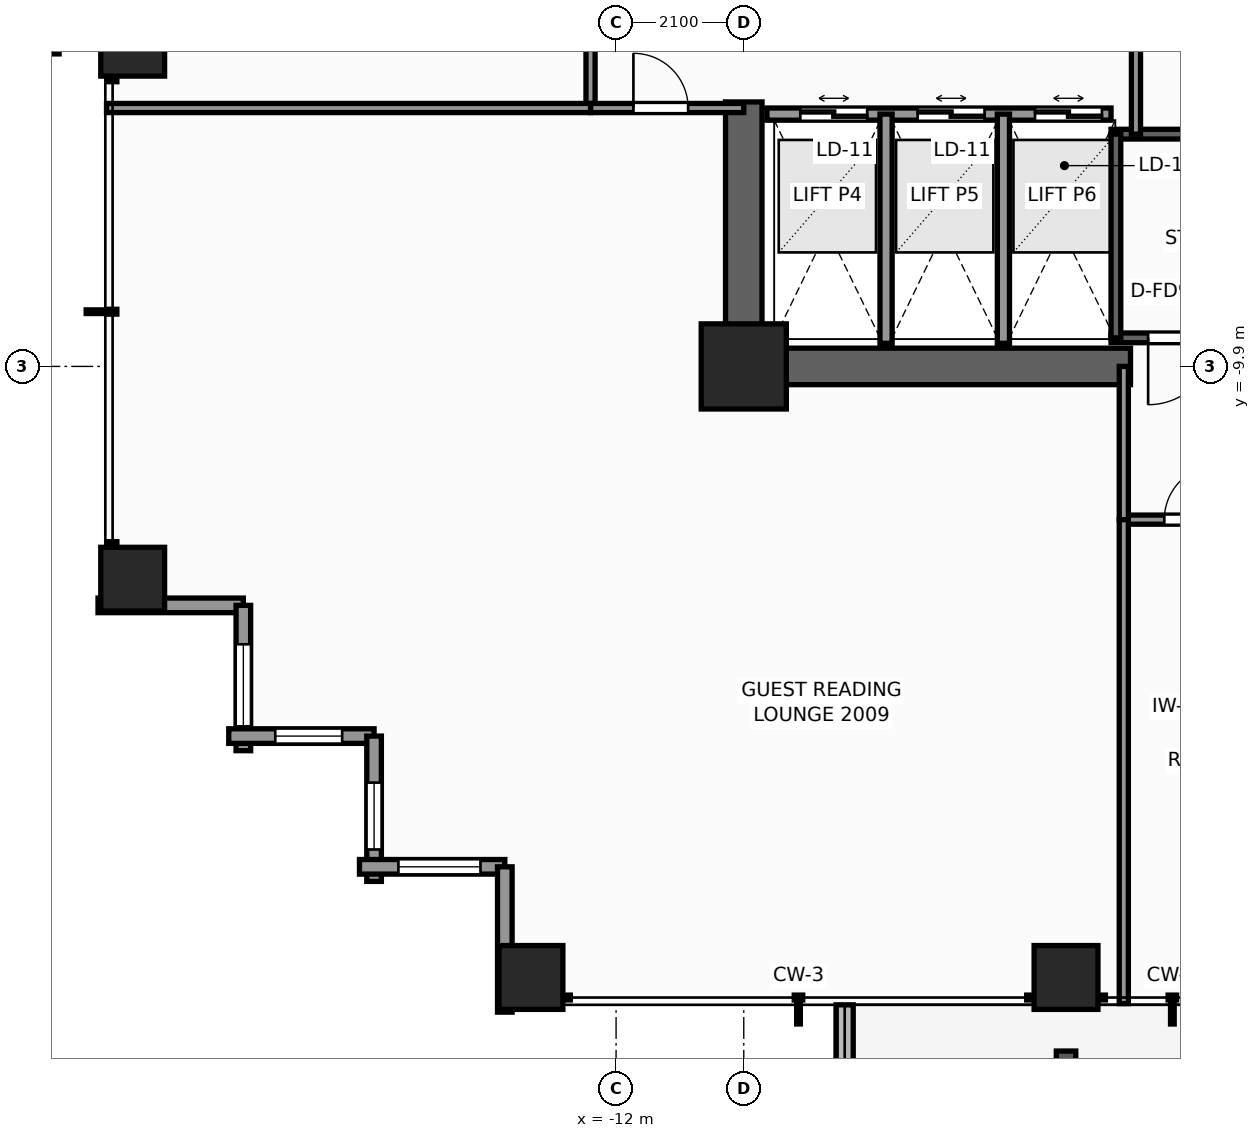
"""IFC4 building model, lengths in metres.
Left out: names, types, materials, properties, quantities, classifications, styles, units other than length and angle.
Written with IfcOpenShell. Run it as: python <this file> out.ifc"""

import sys

from ifc_helpers import new_model, si_unit, direction, frame, frame_2d, origin, origin_2d, place, context, subcontext, project, spatial, rectangle, extrude, element, fill, save


model = new_model("IFC4")
c1 = context("Model", 3, precision=1e-05, world=origin(), true_north=direction((0.0, 1.0)))
c2 = subcontext(c1, "Body", "Model", "MODEL_VIEW")
j1 = project(units=[si_unit("LENGTHUNIT", "METRE"), si_unit("PLANEANGLEUNIT", "RADIAN")], contexts=[c1])
p1 = place(None, origin())
s1 = spatial("IfcSite", under=j1, at=p1, CompositionType="ELEMENT")
p2 = place(p1, origin())
s2 = spatial("IfcBuilding", under=s1, at=p2, CompositionType="ELEMENT")
p3 = place(p2, frame((0.0, 0.0, 72.2)))
s3 = spatial("IfcBuildingStorey", under=s2, at=p3, CompositionType="ELEMENT", Elevation=72.2)
p4 = place(p3, frame((-3.54, -9.9, 0.0), z_axis=(0.0, 0.0, 1.0), x_axis=(-1.0, 0.0, 0.0)))
e1 = element("IfcWall", 1, at=p4, inside=s3, PredefinedType="SHEAR", context=c2, shape_type="SweptSolid", body=[
    extrude(rectangle(XDim=6.66, YDim=0.6, at=frame_2d((3.33, 0.0))), origin(), (0.0, 0.0, 1.0), 3.3),
])
p5 = place(p3, frame((-9.9, -9.6, 0.0), z_axis=(0.0, 0.0, 1.0), x_axis=(0.0, 1.0, 0.0)))
e2 = element("IfcWall", 2, at=p5, inside=s3, PredefinedType="SHEAR", context=c2, shape_type="SweptSolid", body=[
    extrude(rectangle(XDim=4.05, YDim=0.6, at=frame_2d((2.025, 0.0))), origin(), (0.0, 0.0, 1.0), 3.3),
])
p6 = place(p3, frame((-9.9, -9.9, 0.0), z_axis=(0.0, 0.0, 1.0), x_axis=(1.0, 0.0, 0.0)))
e3 = element("IfcColumn", 3, at=p6, inside=s3, PredefinedType="COLUMN", context=c2, shape_type="SweptSolid", body=[
    extrude(rectangle(XDim=1.4, YDim=1.4, at=origin_2d()), origin(), (0.0, 0.0, 1.0), 3.3),
])
for number, where, z_axis, x_axis in (
    (4, (-13.4, -19.95, 0.0), (0.0, 0.0, 1.0), (1.0, 0.0, 0.0)),
    (5, (-4.6, -19.95, 0.0), (0.0, 0.0, 1.0), (1.0, 0.0, 0.0)),
    (6, (-19.95, -13.4, 0.0), (0.0, 0.0, 1.0), (1.0, 0.0, 0.0)),
    (7, (-19.95, -4.6, 0.0), (0.0, 0.0, 1.0), (1.0, 0.0, 0.0)),
):
    element("IfcColumn", number, at=place(p3, frame(where, z_axis=z_axis, x_axis=x_axis)), inside=s3, PredefinedType="COLUMN", context=c2, shape_type="SweptSolid", body=[
        extrude(rectangle(XDim=1.05, YDim=1.05, at=origin_2d()), origin(), (0.0, 0.0, 1.0), 3.3),
    ])
p7 = place(p3, frame((-8.24, -20.4, -0.04), z_axis=(0.0, 0.0, 1.0), x_axis=(0.0, -1.0, 0.0)))
e8 = element("IfcWall", 8, at=p7, inside=s3, PredefinedType="PARAPET", context=c2, shape_type="SweptSolid", body=[
    extrude(rectangle(XDim=3.42, YDim=0.28, at=frame_2d((1.71, 0.0))), origin(), (0.0, 0.0, 1.0), 0.42),
])
p8 = place(p3, frame((-18.13, -13.83, 0.0), z_axis=(0.0, 0.0, 1.0), x_axis=(-1.0, 0.0, 0.0)))
e9 = element("IfcWall", 9, at=p8, inside=s3, PredefinedType="STANDARD", context=c2, shape_type="SweptSolid", body=[
    extrude(rectangle(XDim=2.39, YDim=0.24, at=frame_2d((1.195, 0.0))), origin(), (0.0, 0.0, 1.0), 2.459),
])
p9 = place(p3, frame((-18.13, -16.22, 0.0), z_axis=(0.0, 0.0, 1.0), x_axis=(0.0, 1.0, 0.0)))
e10 = element("IfcWall", 10, at=p9, inside=s3, PredefinedType="STANDARD", context=c2, shape_type="SweptSolid", body=[
    extrude(rectangle(XDim=2.39, YDim=0.24, at=frame_2d((1.195, 0.0))), origin(), (0.0, 0.0, 1.0), 2.459),
])
p10 = place(p9, frame((0.4, 0.0, 0.65)))
e11 = element("IfcOpeningElement", 11, at=p10, cuts=e10, PredefinedType="OPENING", context=c2, shape_type="SweptSolid", body=[
    extrude(rectangle(XDim=1.35, YDim=1.55, at=frame_2d((0.675, 0.775))), frame((0.0, 0.13, 0.0), z_axis=(0.0, -1.0, 0.0), x_axis=(1.0, 0.0, 0.0)), (0.0, 0.0, 1.0), 0.26),
])
p11 = place(p3, frame((-15.98, -15.98, 0.0), z_axis=(0.0, 0.0, 1.0), x_axis=(-1.0, 0.0, 0.0)))
e12 = element("IfcWall", 12, at=p11, inside=s3, PredefinedType="STANDARD", context=c2, shape_type="SweptSolid", body=[
    extrude(rectangle(XDim=2.39, YDim=0.24, at=frame_2d((1.195, 0.0))), origin(), (0.0, 0.0, 1.0), 2.459),
])
p12 = place(p11, frame((0.525, 0.0, 0.65)))
e13 = element("IfcOpeningElement", 13, at=p12, cuts=e12, PredefinedType="OPENING", context=c2, shape_type="SweptSolid", body=[
    extrude(rectangle(XDim=1.1, YDim=1.45, at=frame_2d((0.55, 0.725))), frame((0.0, 0.13, 0.0), z_axis=(0.0, -1.0, 0.0), x_axis=(1.0, 0.0, 0.0)), (0.0, 0.0, 1.0), 0.26),
])
p13 = place(p3, frame((-15.98, -18.37, 0.0), z_axis=(0.0, 0.0, 1.0), x_axis=(0.0, 1.0, 0.0)))
e14 = element("IfcWall", 14, at=p13, inside=s3, PredefinedType="STANDARD", context=c2, shape_type="SweptSolid", body=[
    extrude(rectangle(XDim=2.39, YDim=0.24, at=frame_2d((1.195, 0.0))), origin(), (0.0, 0.0, 1.0), 2.459),
])
p14 = place(p13, frame((0.525, 0.0, 0.65)))
e15 = element("IfcOpeningElement", 15, at=p14, cuts=e14, PredefinedType="OPENING", context=c2, shape_type="SweptSolid", body=[
    extrude(rectangle(XDim=1.1, YDim=1.45, at=frame_2d((0.55, 0.725))), frame((0.0, 0.13, 0.0), z_axis=(0.0, -1.0, 0.0), x_axis=(1.0, 0.0, 0.0)), (0.0, 0.0, 1.0), 0.26),
])
p15 = place(p3, frame((-13.83, -18.13, 0.0), z_axis=(0.0, 0.0, 1.0), x_axis=(-1.0, 0.0, 0.0)))
e16 = element("IfcWall", 16, at=p15, inside=s3, PredefinedType="STANDARD", context=c2, shape_type="SweptSolid", body=[
    extrude(rectangle(XDim=2.39, YDim=0.24, at=frame_2d((1.195, 0.0))), origin(), (0.0, 0.0, 1.0), 2.459),
])
p16 = place(p15, frame((0.4, 0.0, 0.65)))
e17 = element("IfcOpeningElement", 17, at=p16, cuts=e16, PredefinedType="OPENING", context=c2, shape_type="SweptSolid", body=[
    extrude(rectangle(XDim=1.35, YDim=1.55, at=frame_2d((0.675, 0.775))), frame((0.0, 0.13, 0.0), z_axis=(0.0, -1.0, 0.0), x_axis=(1.0, 0.0, 0.0)), (0.0, 0.0, 1.0), 0.26),
])
p17 = place(p3, frame((-13.83, -20.52, 0.0), z_axis=(0.0, 0.0, 1.0), x_axis=(0.0, 1.0, 0.0)))
e18 = element("IfcWall", 18, at=p17, inside=s3, PredefinedType="STANDARD", context=c2, shape_type="SweptSolid", body=[
    extrude(rectangle(XDim=2.39, YDim=0.24, at=frame_2d((1.195, 0.0))), origin(), (0.0, 0.0, 1.0), 2.459),
])
p18 = place(p3, frame((3.86, -9.43, 0.0), z_axis=(0.0, 0.0, 1.0), x_axis=(-1.0, 0.0, 0.0)))
e19 = element("IfcWall", 19, at=p18, inside=s3, PredefinedType="SHEAR", context=c2, shape_type="SweptSolid", body=[
    extrude(rectangle(XDim=7.72, YDim=0.16, at=frame_2d((3.86, 0.0))), origin(), (0.0, 0.0, 1.0), 3.3),
])
p19 = place(p18, frame((6.01, 0.0, 0.0)))
e20 = element("IfcOpeningElement", 20, at=p19, cuts=e19, PredefinedType="OPENING", context=c2, shape_type="SweptSolid", body=[
    extrude(rectangle(XDim=1.1, YDim=2.2, at=frame_2d((0.55, 1.1))), frame((0.0, 0.09, 0.0), z_axis=(0.0, -1.0, 0.0), x_axis=(1.0, 0.0, 0.0)), (0.0, 0.0, 1.0), 0.18),
])
p20 = place(p3, frame((-3.86, -6.08, 0.0), z_axis=(0.0, 0.0, 1.0), x_axis=(1.0, 0.0, 0.0)))
e21 = element("IfcWall", 21, at=p20, inside=s3, PredefinedType="SHEAR", context=c2, shape_type="SweptSolid", body=[
    extrude(rectangle(XDim=7.72, YDim=0.16, at=frame_2d((3.86, 0.0))), origin(), (0.0, 0.0, 1.0), 3.3),
])
p21 = place(p3, frame((-3.78, -9.43, 0.0), z_axis=(0.0, 0.0, 1.0), x_axis=(0.0, 1.0, 0.0)))
e22 = element("IfcWall", 22, at=p21, inside=s3, PredefinedType="SHEAR", context=c2, shape_type="SweptSolid", body=[
    extrude(rectangle(XDim=3.35, YDim=0.16, at=frame_2d((1.675, 0.0))), origin(), (0.0, 0.0, 1.0), 3.3),
])
p22 = place(p3, frame((-9.52, -5.75, 0.0), z_axis=(0.0, 0.0, 1.0), x_axis=(1.0, 0.0, 0.0)))
e23 = element("IfcWall", 23, at=p22, inside=s3, PredefinedType="SOLIDWALL", context=c2, shape_type="SweptSolid", body=[
    extrude(rectangle(XDim=5.66, YDim=0.2, at=frame_2d((2.83, 0.0))), origin(), (0.0, 0.0, 1.0), 3.08),
])
p23 = place(p22, frame((0.55, 0.0, 0.0)))
e24 = element("IfcOpeningElement", 24, at=p23, cuts=e23, PredefinedType="OPENING", context=c2, shape_type="SweptSolid", body=[
    extrude(rectangle(XDim=1.1, YDim=2.2, at=frame_2d((0.55, 1.1))), frame((0.0, 0.11, 0.0), z_axis=(0.0, -1.0, 0.0), x_axis=(1.0, 0.0, 0.0)), (0.0, 0.0, 1.0), 0.22),
])
p24 = place(p22, frame((2.48, 0.0, 0.0)))
e25 = element("IfcOpeningElement", 25, at=p24, cuts=e23, PredefinedType="OPENING", context=c2, shape_type="SweptSolid", body=[
    extrude(rectangle(XDim=1.1, YDim=2.2, at=frame_2d((0.55, 1.1))), frame((0.0, 0.11, 0.0), z_axis=(0.0, -1.0, 0.0), x_axis=(1.0, 0.0, 0.0)), (0.0, 0.0, 1.0), 0.22),
])
p25 = place(p22, frame((4.41, 0.0, 0.0)))
e26 = element("IfcOpeningElement", 26, at=p25, cuts=e23, PredefinedType="OPENING", context=c2, shape_type="SweptSolid", body=[
    extrude(rectangle(XDim=1.1, YDim=2.2, at=frame_2d((0.55, 1.1))), frame((0.0, 0.11, 0.0), z_axis=(0.0, -1.0, 0.0), x_axis=(1.0, 0.0, 0.0)), (0.0, 0.0, 1.0), 0.22),
])
for number, where, z_axis, x_axis in (
    (27, (-7.56, -9.52, 0.0), (0.0, 0.0, 1.0), (0.0, 1.0, 0.0)),
    (28, (-5.63, -9.52, 0.0), (0.0, 0.0, 1.0), (0.0, 1.0, 0.0)),
):
    element("IfcWall", number, at=place(p3, frame(where, z_axis=z_axis, x_axis=x_axis)), inside=s3, PredefinedType="SOLIDWALL", context=c2, shape_type="SweptSolid", body=[
        extrude(rectangle(XDim=3.77, YDim=0.2, at=frame_2d((1.885, 0.0))), origin(), (0.0, 0.0, 1.0), 3.08),
    ])
p26 = place(p3, frame((-3.45, -6.08, 0.0), z_axis=(0.0, 0.0, 1.0), x_axis=(0.0, 1.0, 0.0)))
e29 = element("IfcWall", 29, at=p26, inside=s3, PredefinedType="PARTITIONING", context=c2, shape_type="SweptSolid", body=[
    extrude(rectangle(XDim=2.36, YDim=0.15, at=frame_2d((1.18, 0.0))), origin(), (0.0, 0.0, 1.0), 3.08),
])
p27 = place(p3, frame((-3.65, -12.42, 0.0), z_axis=(0.0, 0.0, 1.0), x_axis=(1.0, 0.0, 0.0)))
e30 = element("IfcWall", 30, at=p27, inside=s3, PredefinedType="PARTITIONING", context=c2, shape_type="SweptSolid", body=[
    extrude(rectangle(XDim=16.23, YDim=0.15, at=frame_2d((8.115, 0.0))), origin(), (0.0, 0.0, 1.0), 2.292),
])
p28 = place(p27, frame((0.666, 0.0, 0.0)))
e31 = element("IfcOpeningElement", 31, at=p28, cuts=e30, PredefinedType="OPENING", context=c2, shape_type="SweptSolid", body=[
    extrude(rectangle(XDim=0.9, YDim=2.06, at=frame_2d((0.45, 1.03))), frame((0.0, 0.085, 0.0), z_axis=(0.0, -1.0, 0.0), x_axis=(1.0, 0.0, 0.0)), (0.0, 0.0, 1.0), 0.17),
])
p29 = place(p27, frame((4.08, 0.0, 0.0)))
e32 = element("IfcOpeningElement", 32, at=p29, cuts=e30, PredefinedType="OPENING", context=c2, shape_type="SweptSolid", body=[
    extrude(rectangle(XDim=0.95, YDim=2.06, at=frame_2d((0.475, 1.03))), frame((0.0, 0.085, 0.0), z_axis=(0.0, -1.0, 0.0), x_axis=(1.0, 0.0, 0.0)), (0.0, 0.0, 1.0), 0.17),
])
p30 = place(p27, frame((10.735, 0.0, 0.0)))
e33 = element("IfcOpeningElement", 33, at=p30, cuts=e30, PredefinedType="OPENING", context=c2, shape_type="SweptSolid", body=[
    extrude(rectangle(XDim=0.9, YDim=2.06, at=frame_2d((0.45, 1.03))), frame((0.0, 0.085, 0.0), z_axis=(0.0, -1.0, 0.0), x_axis=(1.0, 0.0, 0.0)), (0.0, 0.0, 1.0), 0.17),
])
p31 = place(p3, frame((-3.65, -12.42, 0.0), z_axis=(0.0, 0.0, 1.0), x_axis=(0.0, 1.0, 0.0)))
e34 = element("IfcWall", 34, at=p31, inside=s3, PredefinedType="PARTITIONING", context=c2, shape_type="SweptSolid", body=[
    extrude(rectangle(XDim=2.52, YDim=0.15, at=frame_2d((1.26, 0.0))), origin(), (0.0, 0.0, 1.0), 3.08),
])
p32 = place(p3, frame((-12.42, -5.65, 0.0), z_axis=(0.0, 0.0, 1.0), x_axis=(0.0, 1.0, 0.0)))
e35 = element("IfcWall", 35, at=p32, inside=s3, PredefinedType="PARTITIONING", context=c2, shape_type="SweptSolid", body=[
    extrude(rectangle(XDim=3.6, YDim=0.15, at=frame_2d((1.8, 0.0))), origin(), (0.0, 0.0, 1.0), 2.292),
])
p33 = place(p32, frame((2.156, 0.0, 0.0)))
e36 = element("IfcOpeningElement", 36, at=p33, cuts=e35, PredefinedType="OPENING", context=c2, shape_type="SweptSolid", body=[
    extrude(rectangle(XDim=0.9, YDim=2.06, at=frame_2d((0.45, 1.03))), frame((0.0, 0.085, 0.0), z_axis=(0.0, -1.0, 0.0), x_axis=(1.0, 0.0, 0.0)), (0.0, 0.0, 1.0), 0.17),
])
p34 = place(p3, frame((-12.42, -5.65, 0.0), z_axis=(0.0, 0.0, 1.0), x_axis=(1.0, 0.0, 0.0)))
e37 = element("IfcWall", 37, at=p34, inside=s3, PredefinedType="PARTITIONING", context=c2, shape_type="SweptSolid", body=[
    extrude(rectangle(XDim=2.52, YDim=0.15, at=frame_2d((1.26, 0.0))), origin(), (0.0, 0.0, 1.0), 3.08),
])
p35 = place(p34, frame((0.705, 0.0, 0.0)))
e38 = element("IfcOpeningElement", 38, at=p35, cuts=e37, PredefinedType="OPENING", context=c2, shape_type="SweptSolid", body=[
    extrude(rectangle(XDim=0.9, YDim=2.06, at=frame_2d((0.45, 1.03))), frame((0.0, 0.085, 0.0), z_axis=(0.0, -1.0, 0.0), x_axis=(1.0, 0.0, 0.0)), (0.0, 0.0, 1.0), 0.17),
])
for number, where, z_axis, x_axis in (
    (39, (-20.38, -5.65, 0.0), (0.0, 0.0, 1.0), (1.0, 0.0, 0.0)),
    (40, (-3.65, -20.38, 0.0), (0.0, 0.0, 1.0), (0.0, 1.0, 0.0)),
):
    element("IfcWall", number, at=place(p3, frame(where, z_axis=z_axis, x_axis=x_axis)), inside=s3, PredefinedType="PARTITIONING", context=c2, shape_type="SweptSolid", body=[
        extrude(rectangle(XDim=7.96, YDim=0.15, at=frame_2d((3.98, 0.0))), origin(), (0.0, 0.0, 1.0), 2.449),
    ])
p36 = place(p10, origin())
e41 = element("IfcWindow", 41, at=p36, inside=s3, PartitioningType="SINGLE_PANEL", PredefinedType="WINDOW", context=c2, shape_type="SweptSolid", body=[
    extrude(rectangle(XDim=1.35, YDim=1.55, at=frame_2d((0.675, 0.775))), frame((0.0, 0.03, 0.0), z_axis=(0.0, -1.0, 0.0), x_axis=(1.0, 0.0, 0.0)), (0.0, 0.0, 1.0), 0.06),
])
fill(e11, e41)
p37 = place(p12, origin())
e42 = element("IfcWindow", 42, at=p37, inside=s3, PartitioningType="SINGLE_PANEL", PredefinedType="WINDOW", context=c2, shape_type="SweptSolid", body=[
    extrude(rectangle(XDim=1.1, YDim=1.45, at=frame_2d((0.55, 0.725))), frame((0.0, 0.03, 0.0), z_axis=(0.0, -1.0, 0.0), x_axis=(1.0, 0.0, 0.0)), (0.0, 0.0, 1.0), 0.06),
])
fill(e13, e42)
p38 = place(p14, origin())
e43 = element("IfcWindow", 43, at=p38, inside=s3, PartitioningType="SINGLE_PANEL", PredefinedType="WINDOW", context=c2, shape_type="SweptSolid", body=[
    extrude(rectangle(XDim=1.1, YDim=1.45, at=frame_2d((0.55, 0.725))), frame((0.0, 0.03, 0.0), z_axis=(0.0, -1.0, 0.0), x_axis=(1.0, 0.0, 0.0)), (0.0, 0.0, 1.0), 0.06),
])
fill(e15, e43)
p39 = place(p16, origin())
e44 = element("IfcWindow", 44, at=p39, inside=s3, PartitioningType="SINGLE_PANEL", PredefinedType="WINDOW", context=c2, shape_type="SweptSolid", body=[
    extrude(rectangle(XDim=1.35, YDim=1.55, at=frame_2d((0.675, 0.775))), frame((0.0, 0.03, 0.0), z_axis=(0.0, -1.0, 0.0), x_axis=(1.0, 0.0, 0.0)), (0.0, 0.0, 1.0), 0.06),
])
fill(e17, e44)
p40 = place(p19, origin())
e45 = element("IfcDoor", 45, at=p40, inside=s3, OperationType="SINGLE_SWING_RIGHT", PredefinedType="DOOR", context=c2, shape_type="SweptSolid", body=[
    extrude(rectangle(XDim=1.1, YDim=2.2, at=frame_2d((0.55, 1.1))), frame((0.0, 0.025, 0.0), z_axis=(0.0, -1.0, 0.0), x_axis=(1.0, 0.0, 0.0)), (0.0, 0.0, 1.0), 0.05),
])
fill(e20, e45)
p41 = place(p23, origin())
e46 = element("IfcDoor", 46, at=p41, inside=s3, OperationType="DOUBLE_DOOR_SLIDING", PredefinedType="DOOR", context=c2, shape_type="SweptSolid", body=[
    extrude(rectangle(XDim=1.1, YDim=2.2, at=frame_2d((0.55, 1.1))), frame((0.0, 0.025, 0.0), z_axis=(0.0, -1.0, 0.0), x_axis=(1.0, 0.0, 0.0)), (0.0, 0.0, 1.0), 0.05),
])
fill(e24, e46)
p42 = place(p24, origin())
e47 = element("IfcDoor", 47, at=p42, inside=s3, OperationType="DOUBLE_DOOR_SLIDING", PredefinedType="DOOR", context=c2, shape_type="SweptSolid", body=[
    extrude(rectangle(XDim=1.1, YDim=2.2, at=frame_2d((0.55, 1.1))), frame((0.0, 0.025, 0.0), z_axis=(0.0, -1.0, 0.0), x_axis=(1.0, 0.0, 0.0)), (0.0, 0.0, 1.0), 0.05),
])
fill(e25, e47)
p43 = place(p25, origin())
e48 = element("IfcDoor", 48, at=p43, inside=s3, OperationType="DOUBLE_DOOR_SLIDING", PredefinedType="DOOR", context=c2, shape_type="SweptSolid", body=[
    extrude(rectangle(XDim=1.1, YDim=2.2, at=frame_2d((0.55, 1.1))), frame((0.0, 0.025, 0.0), z_axis=(0.0, -1.0, 0.0), x_axis=(1.0, 0.0, 0.0)), (0.0, 0.0, 1.0), 0.05),
])
fill(e26, e48)
p44 = place(p35, origin())
e49 = element("IfcDoor", 49, at=p44, inside=s3, OperationType="SINGLE_SWING_LEFT", PredefinedType="DOOR", context=c2, shape_type="SweptSolid", body=[
    extrude(rectangle(XDim=0.9, YDim=2.06, at=frame_2d((0.45, 1.03))), frame((0.0, 0.025, 0.0), z_axis=(0.0, -1.0, 0.0), x_axis=(1.0, 0.0, 0.0)), (0.0, 0.0, 1.0), 0.05),
])
fill(e38, e49)
p45 = place(p28, origin())
e50 = element("IfcDoor", 50, at=p45, inside=s3, OperationType="SINGLE_SWING_RIGHT", PredefinedType="DOOR", context=c2, shape_type="SweptSolid", body=[
    extrude(rectangle(XDim=0.9, YDim=2.06, at=frame_2d((0.45, 1.03))), frame((0.0, 0.025, 0.0), z_axis=(0.0, -1.0, 0.0), x_axis=(1.0, 0.0, 0.0)), (0.0, 0.0, 1.0), 0.05),
])
fill(e31, e50)
save(model, sys.argv[1])
